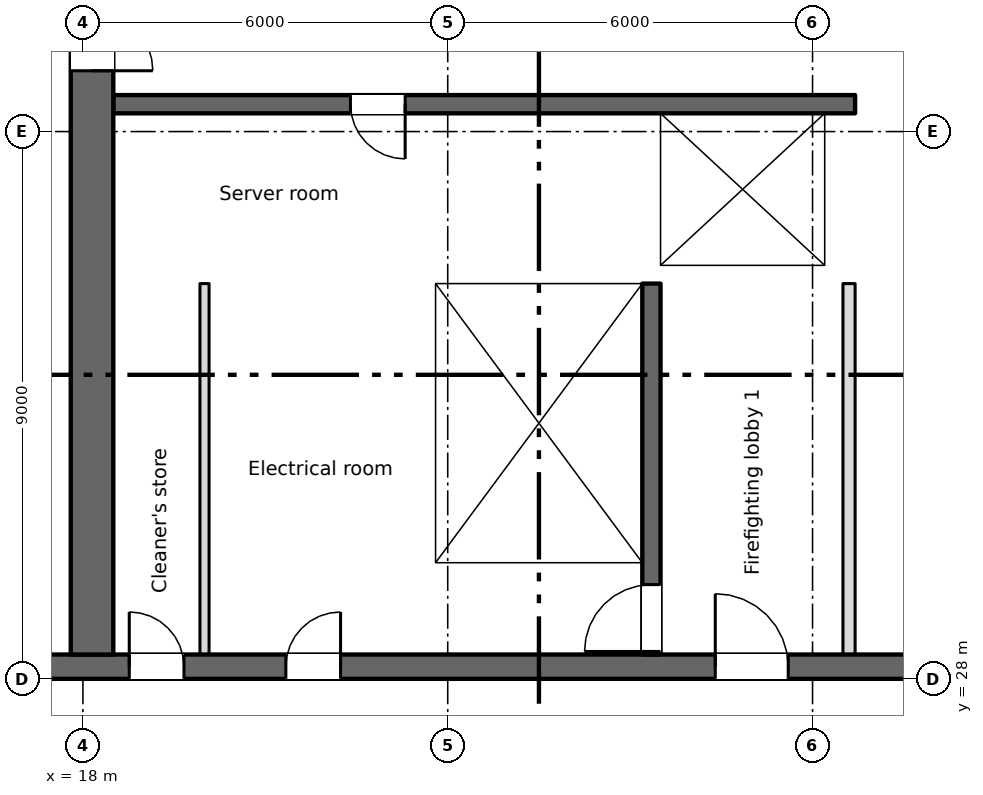
"""IFC4 building model, lengths in metres.
Left out: names, types, materials, properties, quantities, classifications, styles, units other than length and angle.
Written with IfcOpenShell. Run it as: python <this file> out.ifc"""

import sys

from ifc_helpers import new_model, si_unit, direction, frame, frame_2d, origin, place, context, subcontext, project, spatial, rectangle, extrude, element, fill, save


model = new_model("IFC4")
c1 = context("Model", 3, precision=1e-05, world=origin(), true_north=direction((0.0, 1.0)))
c2 = subcontext(c1, "Body", "Model", "MODEL_VIEW")
j1 = project(units=[si_unit("LENGTHUNIT", "METRE"), si_unit("PLANEANGLEUNIT", "RADIAN")], contexts=[c1])
p1 = place(None, origin())
s1 = spatial("IfcSite", under=j1, at=p1, CompositionType="ELEMENT")
p2 = place(p1, origin())
s2 = spatial("IfcBuilding", under=s1, at=p2, CompositionType="ELEMENT")
p3 = place(p2, frame((0.0, 0.0, 223.0)))
s3 = spatial("IfcBuildingStorey", under=s2, at=p3, CompositionType="ELEMENT", Elevation=223.0)
p4 = place(p3, frame((6.6, 28.2, 0.0), z_axis=(0.0, 0.0, 1.0), x_axis=(1.0, 0.0, 0.0)))
e1 = element("IfcWall", 1, at=p4, inside=s3, PredefinedType="SHEAR", context=c2, shape_type="SweptSolid", body=[
    extrude(rectangle(XDim=57.9, YDim=0.4, at=frame_2d((28.95, 0.0))), origin(), (0.0, 0.0, 1.0), 3.15),
])
p5 = place(p4, frame((12.163, 0.0, 0.0)))
e2 = element("IfcOpeningElement", 2, at=p5, cuts=e1, PredefinedType="OPENING", context=c2, shape_type="SweptSolid", body=[
    extrude(rectangle(XDim=0.9, YDim=2.1, at=frame_2d((0.45, 1.05))), frame((0.0, 0.21, 0.0), z_axis=(0.0, -1.0, 0.0), x_axis=(1.0, 0.0, 0.0)), (0.0, 0.0, 1.0), 0.42),
])
p6 = place(p4, frame((14.738, 0.0, 0.0)))
e3 = element("IfcOpeningElement", 3, at=p6, cuts=e1, PredefinedType="OPENING", context=c2, shape_type="SweptSolid", body=[
    extrude(rectangle(XDim=0.9, YDim=2.1, at=frame_2d((0.45, 1.05))), frame((0.0, 0.21, 0.0), z_axis=(0.0, -1.0, 0.0), x_axis=(1.0, 0.0, 0.0)), (0.0, 0.0, 1.0), 0.42),
])
p7 = place(p4, frame((49.163, 0.0, 0.0)))
e4 = element("IfcOpeningElement", 4, at=p7, cuts=e1, PredefinedType="OPENING", context=c2, shape_type="SweptSolid", body=[
    extrude(rectangle(XDim=0.9, YDim=2.1, at=frame_2d((0.45, 1.05))), frame((0.0, 0.21, 0.0), z_axis=(0.0, -1.0, 0.0), x_axis=(1.0, 0.0, 0.0)), (0.0, 0.0, 1.0), 0.42),
])
p8 = place(p4, frame((51.738, 0.0, 0.0)))
e5 = element("IfcOpeningElement", 5, at=p8, cuts=e1, PredefinedType="OPENING", context=c2, shape_type="SweptSolid", body=[
    extrude(rectangle(XDim=0.9, YDim=2.1, at=frame_2d((0.45, 1.05))), frame((0.0, 0.21, 0.0), z_axis=(0.0, -1.0, 0.0), x_axis=(1.0, 0.0, 0.0)), (0.0, 0.0, 1.0), 0.42),
])
p9 = place(p4, frame((1.45, 0.0, 0.0)))
e6 = element("IfcOpeningElement", 6, at=p9, cuts=e1, PredefinedType="OPENING", context=c2, shape_type="SweptSolid", body=[
    extrude(rectangle(XDim=0.9, YDim=2.1, at=frame_2d((0.45, 1.05))), frame((0.0, 0.21, 0.0), z_axis=(0.0, -1.0, 0.0), x_axis=(1.0, 0.0, 0.0)), (0.0, 0.0, 1.0), 0.42),
])
p10 = place(p4, frame((4.8, 0.0, 0.0)))
e7 = element("IfcOpeningElement", 7, at=p10, cuts=e1, PredefinedType="OPENING", context=c2, shape_type="SweptSolid", body=[
    extrude(rectangle(XDim=1.2, YDim=2.1, at=frame_2d((0.6, 1.05))), frame((0.0, 0.21, 0.0), z_axis=(0.0, -1.0, 0.0), x_axis=(1.0, 0.0, 0.0)), (0.0, 0.0, 1.0), 0.42),
])
p11 = place(p4, frame((31.8, 0.0, 0.0)))
e8 = element("IfcOpeningElement", 8, at=p11, cuts=e1, PredefinedType="OPENING", context=c2, shape_type="SweptSolid", body=[
    extrude(rectangle(XDim=1.2, YDim=2.1, at=frame_2d((0.6, 1.05))), frame((0.0, 0.21, 0.0), z_axis=(0.0, -1.0, 0.0), x_axis=(1.0, 0.0, 0.0)), (0.0, 0.0, 1.0), 0.42),
])
p12 = place(p4, frame((55.3, 0.0, 0.0)))
e9 = element("IfcOpeningElement", 9, at=p12, cuts=e1, PredefinedType="OPENING", context=c2, shape_type="SweptSolid", body=[
    extrude(rectangle(XDim=1.2, YDim=2.1, at=frame_2d((0.6, 1.05))), frame((0.0, 0.21, 0.0), z_axis=(0.0, -1.0, 0.0), x_axis=(1.0, 0.0, 0.0)), (0.0, 0.0, 1.0), 0.42),
])
p13 = place(p4, frame((21.8, 0.0, 0.0)))
e10 = element("IfcOpeningElement", 10, at=p13, cuts=e1, PredefinedType="OPENING", context=c2, shape_type="SweptSolid", body=[
    extrude(rectangle(XDim=1.2, YDim=2.1, at=frame_2d((0.6, 1.05))), frame((0.0, 0.21, 0.0), z_axis=(0.0, -1.0, 0.0), x_axis=(1.0, 0.0, 0.0)), (0.0, 0.0, 1.0), 0.42),
])
p14 = place(p4, frame((41.8, 0.0, 0.0)))
e11 = element("IfcOpeningElement", 11, at=p14, cuts=e1, PredefinedType="OPENING", context=c2, shape_type="SweptSolid", body=[
    extrude(rectangle(XDim=1.2, YDim=2.1, at=frame_2d((0.6, 1.05))), frame((0.0, 0.21, 0.0), z_axis=(0.0, -1.0, 0.0), x_axis=(1.0, 0.0, 0.0)), (0.0, 0.0, 1.0), 0.42),
])
p15 = place(p4, frame((24.95, 0.0, 0.0)))
e12 = element("IfcOpeningElement", 12, at=p15, cuts=e1, PredefinedType="OPENING", context=c2, shape_type="SweptSolid", body=[
    extrude(rectangle(XDim=2.4, YDim=2.1, at=frame_2d((1.2, 1.05))), frame((0.0, 0.21, 0.0), z_axis=(0.0, -1.0, 0.0), x_axis=(1.0, 0.0, 0.0)), (0.0, 0.0, 1.0), 0.42),
])
p16 = place(p4, frame((37.45, 0.0, 0.0)))
e13 = element("IfcOpeningElement", 13, at=p16, cuts=e1, PredefinedType="OPENING", context=c2, shape_type="SweptSolid", body=[
    extrude(rectangle(XDim=2.4, YDim=2.1, at=frame_2d((1.2, 1.05))), frame((0.0, 0.21, 0.0), z_axis=(0.0, -1.0, 0.0), x_axis=(1.0, 0.0, 0.0)), (0.0, 0.0, 1.0), 0.42),
])
p17 = place(p4, frame((8.1, 0.0, 0.0)))
e14 = element("IfcOpeningElement", 14, at=p17, cuts=e1, PredefinedType="OPENING", context=c2, shape_type="SweptSolid", body=[
    extrude(rectangle(XDim=2.4, YDim=2.1, at=frame_2d((1.2, 1.05))), frame((0.0, 0.21, 0.0), z_axis=(0.0, -1.0, 0.0), x_axis=(1.0, 0.0, 0.0)), (0.0, 0.0, 1.0), 0.42),
])
p18 = place(p4, frame((28.95, 0.0, 0.0)))
e15 = element("IfcOpeningElement", 15, at=p18, cuts=e1, PredefinedType="OPENING", context=c2, shape_type="SweptSolid", body=[
    extrude(rectangle(XDim=0.9, YDim=2.1, at=frame_2d((0.45, 1.05))), frame((0.0, 0.21, 0.0), z_axis=(0.0, -1.0, 0.0), x_axis=(1.0, 0.0, 0.0)), (0.0, 0.0, 1.0), 0.42),
])
p19 = place(p4, frame((34.95, 0.0, 0.0)))
e16 = element("IfcOpeningElement", 16, at=p19, cuts=e1, PredefinedType="OPENING", context=c2, shape_type="SweptSolid", body=[
    extrude(rectangle(XDim=0.9, YDim=2.1, at=frame_2d((0.45, 1.05))), frame((0.0, 0.21, 0.0), z_axis=(0.0, -1.0, 0.0), x_axis=(1.0, 0.0, 0.0)), (0.0, 0.0, 1.0), 0.42),
])
p20 = place(p3, frame((18.15, 28.4, 0.0), z_axis=(0.0, 0.0, 1.0), x_axis=(0.0, 1.0, 0.0)))
e17 = element("IfcWall", 17, at=p20, inside=s3, PredefinedType="SHEAR", context=c2, shape_type="SweptSolid", body=[
    extrude(rectangle(XDim=16.9, YDim=0.7, at=frame_2d((8.45, 0.0))), origin(), (0.0, 0.0, 1.0), 3.15),
])
p21 = place(p20, frame((9.6, 0.0, 0.0)))
e18 = element("IfcOpeningElement", 18, at=p21, cuts=e17, PredefinedType="OPENING", context=c2, shape_type="SweptSolid", body=[
    extrude(rectangle(XDim=2.0, YDim=2.1, at=frame_2d((1.0, 1.05))), frame((0.0, 0.36, 0.0), z_axis=(0.0, -1.0, 0.0), x_axis=(1.0, 0.0, 0.0)), (0.0, 0.0, 1.0), 0.72),
])
p22 = place(p20, frame((15.4, 0.0, 0.0)))
e19 = element("IfcOpeningElement", 19, at=p22, cuts=e17, PredefinedType="OPENING", context=c2, shape_type="SweptSolid", body=[
    extrude(rectangle(XDim=1.2, YDim=2.1, at=frame_2d((0.6, 1.05))), frame((0.0, 0.36, 0.0), z_axis=(0.0, -1.0, 0.0), x_axis=(1.0, 0.0, 0.0)), (0.0, 0.0, 1.0), 0.72),
])
p23 = place(p3, frame((23.65, 28.4, 0.0), z_axis=(0.0, 0.0, 1.0), x_axis=(0.0, 1.0, 0.0)))
e20 = element("IfcWall", 20, at=p23, inside=s3, PredefinedType="SHEAR", context=c2, shape_type="SweptSolid", body=[
    extrude(rectangle(XDim=6.1, YDim=0.3, at=frame_2d((3.05, 0.0))), origin(), (0.0, 0.0, 1.0), 3.15),
])
p24 = place(p3, frame((27.35, 28.4, 0.0), z_axis=(0.0, 0.0, 1.0), x_axis=(0.0, 1.0, 0.0)))
e21 = element("IfcWall", 21, at=p24, inside=s3, PredefinedType="SHEAR", context=c2, shape_type="SweptSolid", body=[
    extrude(rectangle(XDim=6.1, YDim=0.3, at=frame_2d((3.05, 0.0))), origin(), (0.0, 0.0, 1.0), 3.15),
])
p25 = place(p24, frame((0.05, 0.0, 0.0)))
e22 = element("IfcOpeningElement", 22, at=p25, cuts=e21, PredefinedType="OPENING", context=c2, shape_type="SweptSolid", body=[
    extrude(rectangle(XDim=1.1, YDim=2.1, at=frame_2d((0.55, 1.05))), frame((0.0, 0.16, 0.0), z_axis=(0.0, -1.0, 0.0), x_axis=(1.0, 0.0, 0.0)), (0.0, 0.0, 1.0), 0.32),
])
p26 = place(p3, frame((18.5, 34.65, 0.0), z_axis=(0.0, 0.0, 1.0), x_axis=(1.0, 0.0, 0.0)))
e23 = element("IfcWall", 23, at=p26, inside=s3, PredefinedType="SHEAR", context=c2, shape_type="SweptSolid", body=[
    extrude(rectangle(XDim=12.2, YDim=0.3, at=frame_2d((6.1, 0.0))), origin(), (0.0, 0.0, 1.0), 3.15),
])
p27 = place(p26, frame((9.8, 0.0, 0.0)))
e24 = element("IfcOpeningElement", 24, at=p27, cuts=e23, PredefinedType="OPENING", context=c2, shape_type="SweptSolid", body=[
    extrude(rectangle(XDim=1.1, YDim=2.1, at=frame_2d((0.55, 1.05))), frame((0.0, 0.16, 0.0), z_axis=(0.0, -1.0, 0.0), x_axis=(1.0, 0.0, 0.0)), (0.0, 0.0, 1.0), 0.32),
])
p28 = place(p3, frame((30.7, 37.45, 0.0), z_axis=(0.0, 0.0, 1.0), x_axis=(-1.0, 0.0, 0.0)))
e25 = element("IfcWall", 25, at=p28, inside=s3, PredefinedType="SHEAR", context=c2, shape_type="SweptSolid", body=[
    extrude(rectangle(XDim=12.2, YDim=0.3, at=frame_2d((6.1, 0.0))), origin(), (0.0, 0.0, 1.0), 3.15),
])
p29 = place(p28, frame((7.4, 0.0, 0.0)))
e26 = element("IfcOpeningElement", 26, at=p29, cuts=e25, PredefinedType="OPENING", context=c2, shape_type="SweptSolid", body=[
    extrude(rectangle(XDim=0.9, YDim=2.1, at=frame_2d((0.45, 1.05))), frame((0.0, 0.16, 0.0), z_axis=(0.0, -1.0, 0.0), x_axis=(1.0, 0.0, 0.0)), (0.0, 0.0, 1.0), 0.32),
])
p30 = place(p3, frame((27.35, 34.8, 0.0), z_axis=(0.0, 0.0, 1.0), x_axis=(0.0, 1.0, 0.0)))
e27 = element("IfcWall", 27, at=p30, inside=s3, PredefinedType="SHEAR", context=c2, shape_type="SweptSolid", body=[
    extrude(rectangle(XDim=2.5, YDim=0.3, at=frame_2d((1.25, 0.0))), origin(), (0.0, 0.0, 1.0), 3.15),
])
p31 = place(p3, frame((30.45, 34.8, 0.0), z_axis=(0.0, 0.0, 1.0), x_axis=(0.0, 1.0, 0.0)))
e28 = element("IfcWall", 28, at=p31, inside=s3, PredefinedType="SHEAR", context=c2, shape_type="SweptSolid", body=[
    extrude(rectangle(XDim=2.5, YDim=0.5, at=frame_2d((1.25, 0.0))), origin(), (0.0, 0.0, 1.0), 3.15),
])
p32 = place(p3, frame((30.6, 28.4, 0.0), z_axis=(0.0, 0.0, 1.0), x_axis=(0.0, 1.0, 0.0)))
e29 = element("IfcWall", 29, at=p32, inside=s3, PredefinedType="PARTITIONING", context=c2, shape_type="SweptSolid", body=[
    extrude(rectangle(XDim=6.1, YDim=0.2, at=frame_2d((3.05, 0.0))), origin(), (0.0, 0.0, 1.0), 3.15),
])
p33 = place(p3, frame((20.0, 28.4, 0.0), z_axis=(0.0, 0.0, 1.0), x_axis=(0.0, 1.0, 0.0)))
e30 = element("IfcWall", 30, at=p33, inside=s3, PredefinedType="PARTITIONING", context=c2, shape_type="SweptSolid", body=[
    extrude(rectangle(XDim=6.1, YDim=0.15, at=frame_2d((3.05, 0.0))), origin(), (0.0, 0.0, 1.0), 3.15),
])
p34 = place(p5, origin())
e31 = element("IfcDoor", 31, at=p34, inside=s3, OperationType="SINGLE_SWING_LEFT", PredefinedType="DOOR", context=c2, shape_type="SweptSolid", body=[
    extrude(rectangle(XDim=0.9, YDim=2.1, at=frame_2d((0.45, 1.05))), frame((0.0, 0.025, 0.0), z_axis=(0.0, -1.0, 0.0), x_axis=(1.0, 0.0, 0.0)), (0.0, 0.0, 1.0), 0.05),
])
fill(e2, e31)
p35 = place(p6, origin())
e32 = element("IfcDoor", 32, at=p35, inside=s3, OperationType="SINGLE_SWING_RIGHT", PredefinedType="DOOR", context=c2, shape_type="SweptSolid", body=[
    extrude(rectangle(XDim=0.9, YDim=2.1, at=frame_2d((0.45, 1.05))), frame((0.0, 0.025, 0.0), z_axis=(0.0, -1.0, 0.0), x_axis=(1.0, 0.0, 0.0)), (0.0, 0.0, 1.0), 0.05),
])
fill(e3, e32)
p36 = place(p29, origin())
e33 = element("IfcDoor", 33, at=p36, inside=s3, OperationType="SINGLE_SWING_LEFT", PredefinedType="DOOR", context=c2, shape_type="SweptSolid", body=[
    extrude(rectangle(XDim=0.9, YDim=2.1, at=frame_2d((0.45, 1.05))), frame((0.0, 0.025, 0.0), z_axis=(0.0, -1.0, 0.0), x_axis=(1.0, 0.0, 0.0)), (0.0, 0.0, 1.0), 0.05),
])
fill(e26, e33)
p37 = place(p27, origin())
e34 = element("IfcDoor", 34, at=p37, inside=s3, OperationType="SLIDING_TO_LEFT", PredefinedType="DOOR", context=c2, shape_type="SweptSolid", body=[
    extrude(rectangle(XDim=1.1, YDim=2.1, at=frame_2d((0.55, 1.05))), frame((0.0, 0.025, 0.0), z_axis=(0.0, -1.0, 0.0), x_axis=(1.0, 0.0, 0.0)), (0.0, 0.0, 1.0), 0.05),
])
fill(e24, e34)
p38 = place(p25, origin())
e35 = element("IfcDoor", 35, at=p38, inside=s3, OperationType="SINGLE_SWING_LEFT", PredefinedType="DOOR", context=c2, shape_type="SweptSolid", body=[
    extrude(rectangle(XDim=1.1, YDim=2.1, at=frame_2d((0.55, 1.05))), frame((0.0, 0.025, 0.0), z_axis=(0.0, -1.0, 0.0), x_axis=(1.0, 0.0, 0.0)), (0.0, 0.0, 1.0), 0.05),
])
fill(e22, e35)
p39 = place(p13, origin())
e36 = element("IfcDoor", 36, at=p39, inside=s3, OperationType="SINGLE_SWING_LEFT", PredefinedType="DOOR", context=c2, shape_type="SweptSolid", body=[
    extrude(rectangle(XDim=1.2, YDim=2.1, at=frame_2d((0.6, 1.05))), frame((0.0, 0.025, 0.0), z_axis=(0.0, -1.0, 0.0), x_axis=(1.0, 0.0, 0.0)), (0.0, 0.0, 1.0), 0.05),
])
fill(e10, e36)
p40 = place(p21, origin())
e37 = element("IfcDoor", 37, at=p40, inside=s3, OperationType="DOUBLE_DOOR_SINGLE_SWING", PredefinedType="DOOR", context=c2, shape_type="SweptSolid", body=[
    extrude(rectangle(XDim=2.0, YDim=2.1, at=frame_2d((1.0, 1.05))), frame((0.0, 0.025, 0.0), z_axis=(0.0, -1.0, 0.0), x_axis=(1.0, 0.0, 0.0)), (0.0, 0.0, 1.0), 0.05),
])
fill(e18, e37)
save(model, sys.argv[1])
